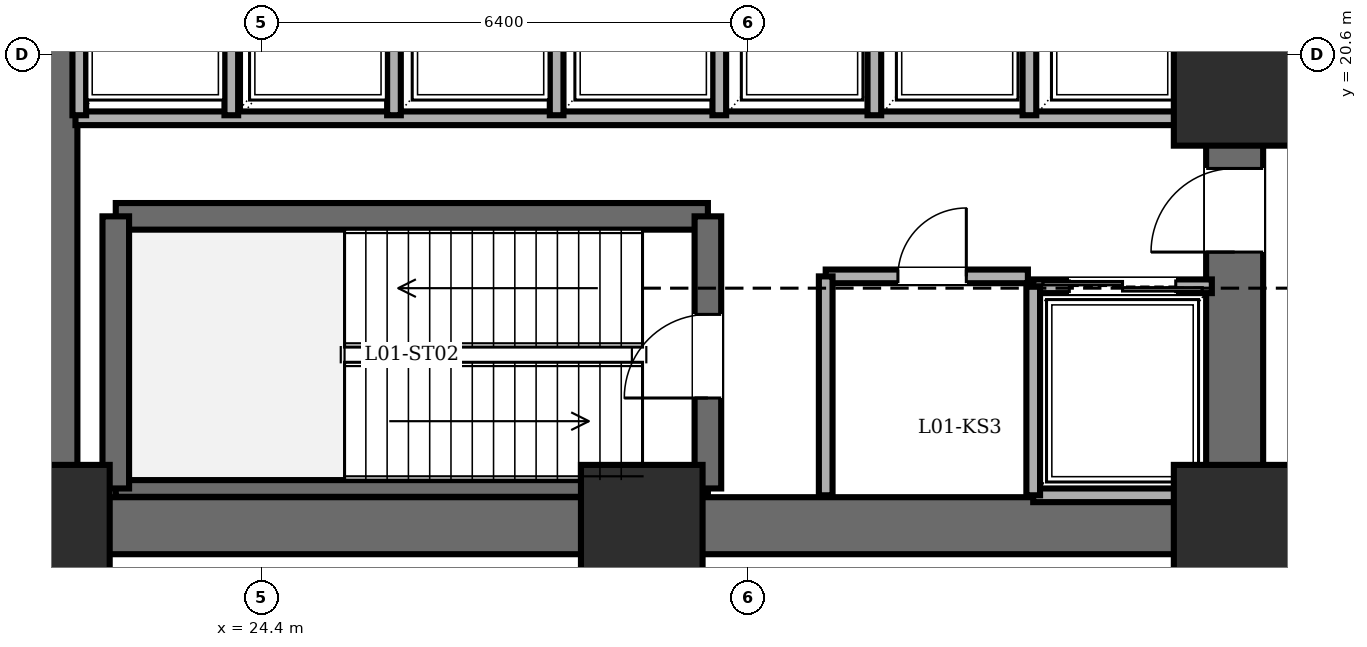
"""IFC4 building model, lengths in metres.
Left out: names, types, materials, properties, quantities, classifications, styles, units other than length and angle.
Written with IfcOpenShell. Run it as: python <this file> out.ifc"""

import sys

from ifc_helpers import new_model, si_unit, direction, frame, frame_2d, origin, origin_2d, place, context, subcontext, project, spatial, rectangle, extrude, element, fill, save


model = new_model("IFC4")
c1 = context("Model", 3, precision=1e-05, world=origin(), true_north=direction((0.0, 1.0)))
c2 = subcontext(c1, "Body", "Model", "MODEL_VIEW")
j1 = project(units=[si_unit("LENGTHUNIT", "METRE"), si_unit("PLANEANGLEUNIT", "RADIAN")], contexts=[c1])
p1 = place(None, origin())
s1 = spatial("IfcSite", under=j1, at=p1, CompositionType="ELEMENT")
p2 = place(p1, origin())
s2 = spatial("IfcBuilding", under=s1, at=p2, CompositionType="ELEMENT")
p3 = place(p2, origin())
s3 = spatial("IfcBuildingStorey", under=s2, at=p3, CompositionType="ELEMENT", Elevation=0.0)
for number, where, z_axis, x_axis in (
    (1, (21.6, 14.4, 0.0), (0.0, 0.0, 1.0), (1.0, 0.0, 0.0)),
    (2, (29.4, 14.4, 0.0), (0.0, 0.0, 1.0), (1.0, 0.0, 0.0)),
    (3, (37.2, 14.4, 0.0), (0.0, 0.0, 1.0), (1.0, 0.0, 0.0)),
    (4, (37.2, 20.2, 0.0), (0.0, 0.0, 1.0), (1.0, 0.0, 0.0)),
):
    element("IfcColumn", number, at=place(p3, frame(where, z_axis=z_axis, x_axis=x_axis)), inside=s3, PredefinedType="COLUMN", context=c2, shape_type="SweptSolid", body=[
        extrude(rectangle(XDim=1.6, YDim=1.6, at=origin_2d()), origin(), (0.0, 0.0, 1.0), 5.4),
    ])
p4 = place(p3, frame((21.6, 14.4, 0.0), z_axis=(0.0, 0.0, 1.0), x_axis=(0.0, 1.0, 0.0)))
e5 = element("IfcWall", 5, at=p4, inside=s3, PredefinedType="SHEAR", context=c2, shape_type="SweptSolid", body=[
    extrude(rectangle(XDim=19.2, YDim=0.75, at=frame_2d((9.6, 0.0))), origin(), (0.0, 0.0, 1.0), 5.18),
])
p5 = place(p3, frame((37.2, 14.4, 0.0), z_axis=(0.0, 0.0, 1.0), x_axis=(-1.0, 0.0, 0.0)))
e6 = element("IfcWall", 6, at=p5, inside=s3, PredefinedType="SHEAR", context=c2, shape_type="SweptSolid", body=[
    extrude(rectangle(XDim=15.6, YDim=0.75, at=frame_2d((7.8, 0.0))), origin(), (0.0, 0.0, 1.0), 5.18),
])
p6 = place(p3, frame((37.2, 14.4, 0.0), z_axis=(0.0, 0.0, 1.0), x_axis=(0.0, 1.0, 0.0)))
e7 = element("IfcWall", 7, at=p6, inside=s3, PredefinedType="SHEAR", context=c2, shape_type="SweptSolid", body=[
    extrude(rectangle(XDim=19.2, YDim=0.75, at=frame_2d((9.6, 0.0))), origin(), (0.0, 0.0, 1.0), 5.18),
])
p7 = place(p6, frame((15.8, 0.0, 0.0)))
e8 = element("IfcOpeningElement", 8, at=p7, cuts=e7, PredefinedType="OPENING", context=c2, shape_type="SweptSolid", body=[
    extrude(rectangle(XDim=1.15, YDim=2.15, at=frame_2d((0.575, 1.075))), frame((0.0, 0.385, 0.0), z_axis=(0.0, -1.0, 0.0), x_axis=(1.0, 0.0, 0.0)), (0.0, 0.0, 1.0), 0.77),
])
p8 = place(p6, frame((3.6, 0.0, 0.0)))
e9 = element("IfcOpeningElement", 9, at=p8, cuts=e7, PredefinedType="OPENING", context=c2, shape_type="SweptSolid", body=[
    extrude(rectangle(XDim=1.1, YDim=2.15, at=frame_2d((0.55, 1.075))), frame((0.0, 0.385, 0.0), z_axis=(0.0, -1.0, 0.0), x_axis=(1.0, 0.0, 0.0)), (0.0, 0.0, 1.0), 0.77),
])
p9 = place(p6, frame((8.6, 0.0, 0.0)))
e10 = element("IfcOpeningElement", 10, at=p9, cuts=e7, PredefinedType="OPENING", context=c2, shape_type="SweptSolid", body=[
    extrude(rectangle(XDim=1.3, YDim=2.2, at=frame_2d((0.65, 1.1))), frame((0.0, 0.385, 0.0), z_axis=(0.0, -1.0, 0.0), x_axis=(1.0, 0.0, 0.0)), (0.0, 0.0, 1.0), 0.77),
])
p10 = place(p3, frame((22.48, 18.47, 0.0), z_axis=(0.0, 0.0, 1.0), x_axis=(1.0, 0.0, 0.0)))
e11 = element("IfcWall", 11, at=p10, inside=s3, PredefinedType="SOLIDWALL", context=c2, shape_type="SweptSolid", body=[
    extrude(rectangle(XDim=7.79, YDim=0.35, at=frame_2d((3.895, 0.0))), origin(), (0.0, 0.0, 1.0), 5.18),
])
p11 = place(p3, frame((22.48, 14.89, 0.0), z_axis=(0.0, 0.0, 1.0), x_axis=(1.0, 0.0, 0.0)))
e12 = element("IfcWall", 12, at=p11, inside=s3, PredefinedType="PARTITIONING", context=c2, shape_type="SweptSolid", body=[
    extrude(rectangle(XDim=7.79, YDim=0.22, at=frame_2d((3.895, 0.0))), origin(), (0.0, 0.0, 1.0), 5.18),
])
p12 = place(p3, frame((22.48, 14.89, 0.0), z_axis=(0.0, 0.0, 1.0), x_axis=(0.0, 1.0, 0.0)))
e13 = element("IfcWall", 13, at=p12, inside=s3, PredefinedType="SOLIDWALL", context=c2, shape_type="SweptSolid", body=[
    extrude(rectangle(XDim=3.58, YDim=0.35, at=frame_2d((1.79, 0.0))), origin(), (0.0, 0.0, 1.0), 5.18),
])
p13 = place(p3, frame((30.27, 14.89, 0.0), z_axis=(0.0, 0.0, 1.0), x_axis=(0.0, 1.0, 0.0)))
e14 = element("IfcWall", 14, at=p13, inside=s3, PredefinedType="SOLIDWALL", context=c2, shape_type="SweptSolid", body=[
    extrude(rectangle(XDim=3.58, YDim=0.35, at=frame_2d((1.79, 0.0))), origin(), (0.0, 0.0, 1.0), 5.18),
])
p14 = place(p13, frame((1.19, 0.0, 0.0)))
e15 = element("IfcOpeningElement", 15, at=p14, cuts=e14, PredefinedType="OPENING", context=c2, shape_type="SweptSolid", body=[
    extrude(rectangle(XDim=1.1, YDim=2.15, at=frame_2d((0.55, 1.075))), frame((0.0, 0.185, 0.0), z_axis=(0.0, -1.0, 0.0), x_axis=(1.0, 0.0, 0.0)), (0.0, 0.0, 1.0), 0.37),
])
p15 = place(p3, frame((21.95, 19.76, 0.0), z_axis=(0.0, 0.0, 1.0), x_axis=(1.0, 0.0, 0.0)))
e16 = element("IfcWall", 16, at=p15, inside=s3, PredefinedType="PARTITIONING", context=c2, shape_type="SweptSolid", body=[
    extrude(rectangle(XDim=14.87, YDim=0.18, at=frame_2d((7.435, 0.0))), origin(), (0.0, 0.0, 1.0), 5.18),
])
p16 = place(p3, frame((31.82, 17.68, 0.0), z_axis=(0.0, 0.0, 1.0), x_axis=(1.0, 0.0, 0.0)))
e17 = element("IfcWall", 17, at=p16, inside=s3, PredefinedType="PARTITIONING", context=c2, shape_type="SweptSolid", body=[
    extrude(rectangle(XDim=2.66, YDim=0.18, at=frame_2d((1.33, 0.0))), origin(), (0.0, 0.0, 1.0), 5.18),
])
p17 = place(p16, frame((0.95, 0.0, 0.0)))
e18 = element("IfcOpeningElement", 18, at=p17, cuts=e17, PredefinedType="OPENING", context=c2, shape_type="SweptSolid", body=[
    extrude(rectangle(XDim=0.9, YDim=2.05, at=frame_2d((0.45, 1.025))), frame((0.0, 0.1, 0.0), z_axis=(0.0, -1.0, 0.0), x_axis=(1.0, 0.0, 0.0)), (0.0, 0.0, 1.0), 0.2),
])
p18 = place(p3, frame((31.82, 14.8, 0.0), z_axis=(0.0, 0.0, 1.0), x_axis=(0.0, 1.0, 0.0)))
e19 = element("IfcWall", 19, at=p18, inside=s3, PredefinedType="PARTITIONING", context=c2, shape_type="SweptSolid", body=[
    extrude(rectangle(XDim=2.88, YDim=0.18, at=frame_2d((1.44, 0.0))), origin(), (0.0, 0.0, 1.0), 5.18),
])
p19 = place(p3, frame((34.55, 17.55, 0.0), z_axis=(0.0, 0.0, 1.0), x_axis=(1.0, 0.0, 0.0)))
e20 = element("IfcWall", 20, at=p19, inside=s3, PredefinedType="PARTITIONING", context=c2, shape_type="SweptSolid", body=[
    extrude(rectangle(XDim=2.35, YDim=0.18, at=frame_2d((1.175, 0.0))), origin(), (0.0, 0.0, 1.0), 5.18),
])
p20 = place(p19, frame((0.475, 0.0, 0.0)))
e21 = element("IfcOpeningElement", 21, at=p20, cuts=e20, PredefinedType="OPENING", context=c2, shape_type="SweptSolid", body=[
    extrude(rectangle(XDim=1.4, YDim=2.3, at=frame_2d((0.7, 1.15))), frame((0.0, 0.1, 0.0), z_axis=(0.0, -1.0, 0.0), x_axis=(1.0, 0.0, 0.0)), (0.0, 0.0, 1.0), 0.2),
])
p21 = place(p3, frame((36.9, 14.8, 0.0), z_axis=(0.0, 0.0, 1.0), x_axis=(-1.0, 0.0, 0.0)))
e22 = element("IfcWall", 22, at=p21, inside=s3, PredefinedType="PARTITIONING", context=c2, shape_type="SweptSolid", body=[
    extrude(rectangle(XDim=2.35, YDim=0.18, at=frame_2d((1.175, 0.0))), origin(), (0.0, 0.0, 1.0), 5.18),
])
p22 = place(p3, frame((34.55, 17.55, 0.0), z_axis=(0.0, 0.0, 1.0), x_axis=(0.0, -1.0, 0.0)))
e23 = element("IfcWall", 23, at=p22, inside=s3, PredefinedType="PARTITIONING", context=c2, shape_type="SweptSolid", body=[
    extrude(rectangle(XDim=2.75, YDim=0.18, at=frame_2d((1.375, 0.0))), origin(), (0.0, 0.0, 1.0), 5.18),
])
for number, where, z_axis, x_axis in (
    (24, (24.0, 19.8, 0.0), (0.0, 0.0, 1.0), (0.0, 1.0, 0.0)),
    (25, (22.0, 22.3, 0.0), (0.0, 0.0, 1.0), (0.0, -1.0, 0.0)),
    (26, (26.14, 19.8, 0.0), (0.0, 0.0, 1.0), (0.0, 1.0, 0.0)),
    (27, (28.28, 19.8, 0.0), (0.0, 0.0, 1.0), (0.0, 1.0, 0.0)),
    (28, (30.42, 19.8, 0.0), (0.0, 0.0, 1.0), (0.0, 1.0, 0.0)),
    (29, (32.46, 19.8, 0.0), (0.0, 0.0, 1.0), (0.0, 1.0, 0.0)),
    (30, (34.5, 19.8, 0.0), (0.0, 0.0, 1.0), (0.0, 1.0, 0.0)),
    (31, (36.54, 19.8, 0.0), (0.0, 0.0, 1.0), (0.0, 1.0, 0.0)),
):
    element("IfcWall", number, at=place(p3, frame(where, z_axis=z_axis, x_axis=x_axis)), inside=s3, PredefinedType="PARTITIONING", context=c2, shape_type="SweptSolid", body=[
        extrude(rectangle(XDim=2.5, YDim=0.18, at=frame_2d((1.25, 0.0))), origin(), (0.0, 0.0, 1.0), 5.18),
    ])
p23 = place(p14, origin())
e32 = element("IfcDoor", 32, at=p23, inside=s3, OperationType="SINGLE_SWING_LEFT", PredefinedType="DOOR", context=c2, shape_type="SweptSolid", body=[
    extrude(rectangle(XDim=1.1, YDim=2.15, at=frame_2d((0.55, 1.075))), frame((0.0, 0.025, 0.0), z_axis=(0.0, -1.0, 0.0), x_axis=(1.0, 0.0, 0.0)), (0.0, 0.0, 1.0), 0.05),
])
fill(e15, e32)
p24 = place(p8, origin())
e33 = element("IfcDoor", 33, at=p24, inside=s3, OperationType="SINGLE_SWING_LEFT", PredefinedType="DOOR", context=c2, shape_type="SweptSolid", body=[
    extrude(rectangle(XDim=1.1, YDim=2.15, at=frame_2d((0.55, 1.075))), frame((0.0, 0.025, 0.0), z_axis=(0.0, -1.0, 0.0), x_axis=(1.0, 0.0, 0.0)), (0.0, 0.0, 1.0), 0.05),
])
fill(e9, e33)
p25 = place(p17, origin())
e34 = element("IfcDoor", 34, at=p25, inside=s3, OperationType="SINGLE_SWING_RIGHT", PredefinedType="DOOR", context=c2, shape_type="SweptSolid", body=[
    extrude(rectangle(XDim=0.9, YDim=2.05, at=frame_2d((0.45, 1.025))), frame((0.0, 0.025, 0.0), z_axis=(0.0, -1.0, 0.0), x_axis=(1.0, 0.0, 0.0)), (0.0, 0.0, 1.0), 0.05),
])
fill(e18, e34)
p26 = place(p20, origin())
e35 = element("IfcDoor", 35, at=p26, inside=s3, OperationType="DOUBLE_DOOR_SLIDING", PredefinedType="DOOR", context=c2, shape_type="SweptSolid", body=[
    extrude(rectangle(XDim=1.4, YDim=2.3, at=frame_2d((0.7, 1.15))), frame((0.0, 0.025, 0.0), z_axis=(0.0, -1.0, 0.0), x_axis=(1.0, 0.0, 0.0)), (0.0, 0.0, 1.0), 0.05),
])
fill(e21, e35)
save(model, sys.argv[1])
